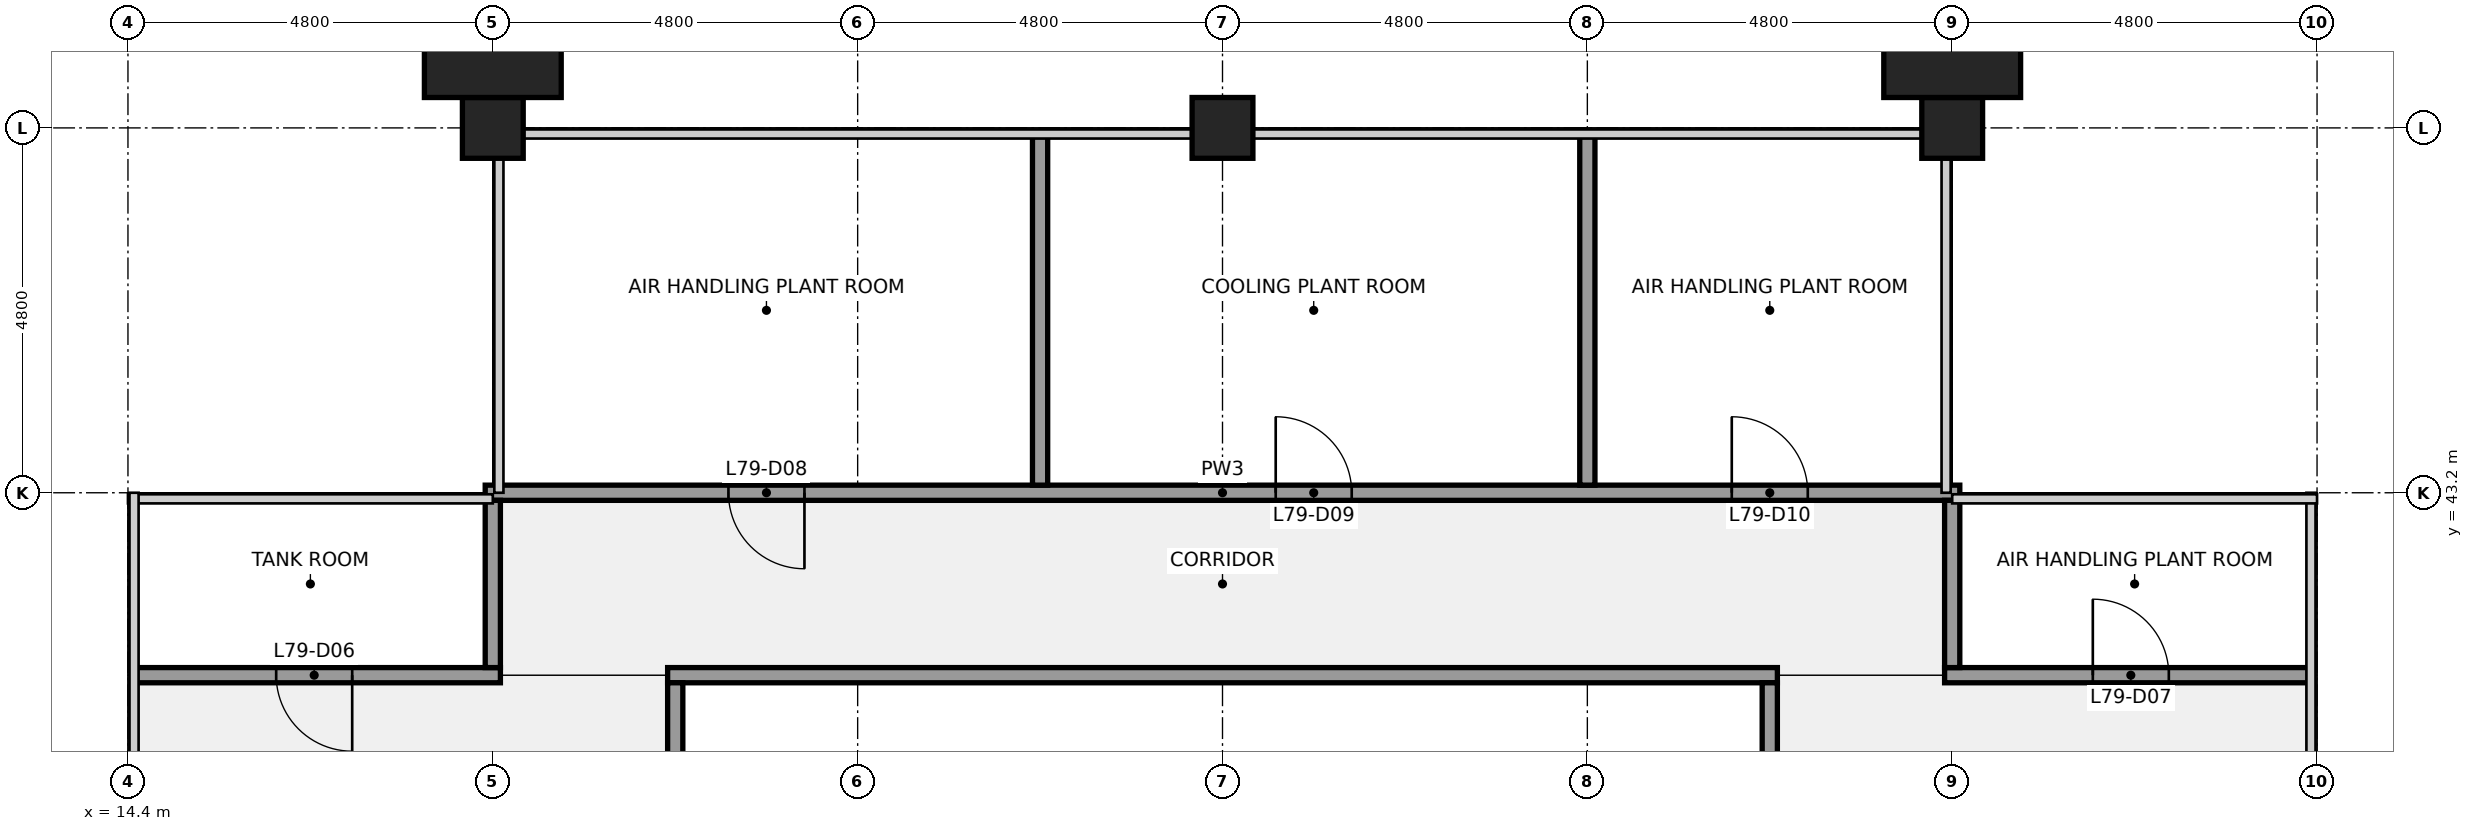
"""IFC4 building model, lengths in metres.
Left out: names, types, materials, properties, quantities, classifications, styles, units other than length and angle.
Written with IfcOpenShell. Run it as: python <this file> out.ifc"""

import sys

from ifc_helpers import new_model, si_unit, direction, frame, frame_2d, origin, origin_2d, place, context, subcontext, project, spatial, rectangle, extrude, element, fill, save


model = new_model("IFC4")
c1 = context("Model", 3, precision=1e-05, world=origin(), true_north=direction((0.0, 1.0)))
c2 = subcontext(c1, "Body", "Model", "MODEL_VIEW")
j1 = project(units=[si_unit("LENGTHUNIT", "METRE"), si_unit("PLANEANGLEUNIT", "RADIAN")], contexts=[c1])
p1 = place(None, origin())
s1 = spatial("IfcSite", under=j1, at=p1, CompositionType="ELEMENT")
p2 = place(p1, origin())
s2 = spatial("IfcBuilding", under=s1, at=p2, CompositionType="ELEMENT")
p3 = place(p2, frame((0.0, 0.0, 354.3)))
s3 = spatial("IfcBuildingStorey", under=s2, at=p3, CompositionType="ELEMENT", Elevation=354.3)
for number, where, z_axis, x_axis in (
    (1, (19.2, 48.0, 0.0), (0.0, 0.0, 1.0), (1.0, 0.0, 0.0)),
    (2, (28.8, 48.0, 0.0), (0.0, 0.0, 1.0), (1.0, 0.0, 0.0)),
    (3, (38.4, 48.0, 0.0), (0.0, 0.0, 1.0), (1.0, 0.0, 0.0)),
):
    element("IfcColumn", number, at=place(p3, frame(where, z_axis=z_axis, x_axis=x_axis)), inside=s3, PredefinedType="COLUMN", context=c2, shape_type="SweptSolid", body=[
        extrude(rectangle(XDim=0.8, YDim=0.8, at=origin_2d()), origin(), (0.0, 0.0, 1.0), 4.0),
    ])
p4 = place(p3, frame((14.5, 40.8, 0.0), z_axis=(0.0, 0.0, 1.0), x_axis=(1.0, 0.0, 0.0)))
e4 = element("IfcWall", 4, at=p4, inside=s3, PredefinedType="PARTITIONING", context=c2, shape_type="SweptSolid", body=[
    extrude(rectangle(XDim=4.8, YDim=0.2, at=frame_2d((2.4, 0.0))), origin(), (0.0, 0.0, 1.0), 2.759),
])
p5 = place(p4, frame((1.85, 0.0, 0.0)))
e5 = element("IfcOpeningElement", 5, at=p5, cuts=e4, PredefinedType="OPENING", context=c2, shape_type="SweptSolid", body=[
    extrude(rectangle(XDim=1.0, YDim=2.1, at=frame_2d((0.5, 1.05))), frame((0.0, 0.11, 0.0), z_axis=(0.0, -1.0, 0.0), x_axis=(1.0, 0.0, 0.0)), (0.0, 0.0, 1.0), 0.22),
])
p6 = place(p3, frame((21.5, 40.8, 0.0), z_axis=(0.0, 0.0, 1.0), x_axis=(1.0, 0.0, 0.0)))
e6 = element("IfcWall", 6, at=p6, inside=s3, PredefinedType="PARTITIONING", context=c2, shape_type="SweptSolid", body=[
    extrude(rectangle(XDim=14.6, YDim=0.2, at=frame_2d((7.3, 0.0))), origin(), (0.0, 0.0, 1.0), 2.759),
])
p7 = place(p3, frame((38.3, 40.8, 0.0), z_axis=(0.0, 0.0, 1.0), x_axis=(1.0, 0.0, 0.0)))
e7 = element("IfcWall", 7, at=p7, inside=s3, PredefinedType="PARTITIONING", context=c2, shape_type="SweptSolid", body=[
    extrude(rectangle(XDim=4.8, YDim=0.2, at=frame_2d((2.4, 0.0))), origin(), (0.0, 0.0, 1.0), 2.759),
])
p8 = place(p7, frame((1.95, 0.0, 0.0)))
e8 = element("IfcOpeningElement", 8, at=p8, cuts=e7, PredefinedType="OPENING", context=c2, shape_type="SweptSolid", body=[
    extrude(rectangle(XDim=1.0, YDim=2.1, at=frame_2d((0.5, 1.05))), frame((0.0, 0.11, 0.0), z_axis=(0.0, -1.0, 0.0), x_axis=(1.0, 0.0, 0.0)), (0.0, 0.0, 1.0), 0.22),
])
p9 = place(p3, frame((19.1, 43.2, 0.0), z_axis=(0.0, 0.0, 1.0), x_axis=(1.0, 0.0, 0.0)))
e9 = element("IfcWall", 9, at=p9, inside=s3, PredefinedType="PARTITIONING", context=c2, shape_type="SweptSolid", body=[
    extrude(rectangle(XDim=19.4, YDim=0.2, at=frame_2d((9.7, 0.0))), origin(), (0.0, 0.0, 1.0), 2.759),
])
p10 = place(p9, frame((3.2, 0.0, 0.0)))
e10 = element("IfcOpeningElement", 10, at=p10, cuts=e9, PredefinedType="OPENING", context=c2, shape_type="SweptSolid", body=[
    extrude(rectangle(XDim=1.0, YDim=2.1, at=frame_2d((0.5, 1.05))), frame((0.0, 0.11, 0.0), z_axis=(0.0, -1.0, 0.0), x_axis=(1.0, 0.0, 0.0)), (0.0, 0.0, 1.0), 0.22),
])
p11 = place(p9, frame((10.4, 0.0, 0.0)))
e11 = element("IfcOpeningElement", 11, at=p11, cuts=e9, PredefinedType="OPENING", context=c2, shape_type="SweptSolid", body=[
    extrude(rectangle(XDim=1.0, YDim=2.1, at=frame_2d((0.5, 1.05))), frame((0.0, 0.11, 0.0), z_axis=(0.0, -1.0, 0.0), x_axis=(1.0, 0.0, 0.0)), (0.0, 0.0, 1.0), 0.22),
])
p12 = place(p9, frame((16.4, 0.0, 0.0)))
e12 = element("IfcOpeningElement", 12, at=p12, cuts=e9, PredefinedType="OPENING", context=c2, shape_type="SweptSolid", body=[
    extrude(rectangle(XDim=1.0, YDim=2.1, at=frame_2d((0.5, 1.05))), frame((0.0, 0.11, 0.0), z_axis=(0.0, -1.0, 0.0), x_axis=(1.0, 0.0, 0.0)), (0.0, 0.0, 1.0), 0.22),
])
p13 = place(p3, frame((19.2, 40.9, 0.0), z_axis=(0.0, 0.0, 1.0), x_axis=(0.0, 1.0, 0.0)))
e13 = element("IfcWall", 13, at=p13, inside=s3, PredefinedType="PARTITIONING", context=c2, shape_type="SweptSolid", body=[
    extrude(rectangle(XDim=2.2, YDim=0.2, at=frame_2d((1.1, 0.0))), origin(), (0.0, 0.0, 1.0), 2.759),
])
p14 = place(p3, frame((21.6, 24.1, 0.0), z_axis=(0.0, 0.0, 1.0), x_axis=(0.0, 1.0, 0.0)))
e14 = element("IfcWall", 14, at=p14, inside=s3, PredefinedType="PARTITIONING", context=c2, shape_type="SweptSolid", body=[
    extrude(rectangle(XDim=16.6, YDim=0.2, at=frame_2d((8.3, 0.0))), origin(), (0.0, 0.0, 1.0), 2.759),
])
p15 = place(p14, frame((7.8, 0.0, 0.0)))
e15 = element("IfcOpeningElement", 15, at=p15, cuts=e14, PredefinedType="OPENING", context=c2, shape_type="SweptSolid", body=[
    extrude(rectangle(XDim=1.0, YDim=2.1, at=frame_2d((0.5, 1.05))), frame((0.0, 0.11, 0.0), z_axis=(0.0, -1.0, 0.0), x_axis=(1.0, 0.0, 0.0)), (0.0, 0.0, 1.0), 0.22),
])
for number, where, z_axis, x_axis in (
    (16, (26.4, 43.3, 0.0), (0.0, 0.0, 1.0), (0.0, 1.0, 0.0)),
    (17, (33.6, 43.3, 0.0), (0.0, 0.0, 1.0), (0.0, 1.0, 0.0)),
):
    element("IfcWall", number, at=place(p3, frame(where, z_axis=z_axis, x_axis=x_axis)), inside=s3, PredefinedType="PARTITIONING", context=c2, shape_type="SweptSolid", body=[
        extrude(rectangle(XDim=4.6, YDim=0.2, at=frame_2d((2.3, 0.0))), origin(), (0.0, 0.0, 1.0), 2.759),
    ])
p16 = place(p3, frame((36.0, 24.1, 0.0), z_axis=(0.0, 0.0, 1.0), x_axis=(0.0, 1.0, 0.0)))
e18 = element("IfcWall", 18, at=p16, inside=s3, PredefinedType="PARTITIONING", context=c2, shape_type="SweptSolid", body=[
    extrude(rectangle(XDim=16.6, YDim=0.2, at=frame_2d((8.3, 0.0))), origin(), (0.0, 0.0, 1.0), 2.759),
])
p17 = place(p3, frame((38.4, 40.9, 0.0), z_axis=(0.0, 0.0, 1.0), x_axis=(0.0, 1.0, 0.0)))
e19 = element("IfcWall", 19, at=p17, inside=s3, PredefinedType="PARTITIONING", context=c2, shape_type="SweptSolid", body=[
    extrude(rectangle(XDim=2.2, YDim=0.2, at=frame_2d((1.1, 0.0))), origin(), (0.0, 0.0, 1.0), 2.759),
])
for number, where, z_axis, x_axis in (
    (20, (19.2, 48.95, 0.0), (0.0, 0.0, 1.0), (1.0, 0.0, 0.0)),
    (21, (38.4, 48.95, 0.0), (0.0, 0.0, 1.0), (1.0, 0.0, 0.0)),
):
    element("IfcColumn", number, at=place(p3, frame(where, z_axis=z_axis, x_axis=x_axis)), inside=s3, PredefinedType="PILASTER", context=c2, shape_type="SweptSolid", body=[
        extrude(rectangle(XDim=1.8, YDim=1.1, at=origin_2d()), origin(), (0.0, 0.0, 1.0), 4.0),
    ])
p18 = place(p5, origin())
e22 = element("IfcDoor", 22, at=p18, inside=s3, OperationType="SINGLE_SWING_RIGHT", PredefinedType="DOOR", context=c2, shape_type="SweptSolid", body=[
    extrude(rectangle(XDim=1.0, YDim=2.1, at=frame_2d((0.5, 1.05))), frame((0.0, 0.025, 0.0), z_axis=(0.0, -1.0, 0.0), x_axis=(1.0, 0.0, 0.0)), (0.0, 0.0, 1.0), 0.05),
])
fill(e5, e22)
p19 = place(p8, origin())
e23 = element("IfcDoor", 23, at=p19, inside=s3, OperationType="SINGLE_SWING_LEFT", PredefinedType="DOOR", context=c2, shape_type="SweptSolid", body=[
    extrude(rectangle(XDim=1.0, YDim=2.1, at=frame_2d((0.5, 1.05))), frame((0.0, 0.025, 0.0), z_axis=(0.0, -1.0, 0.0), x_axis=(1.0, 0.0, 0.0)), (0.0, 0.0, 1.0), 0.05),
])
fill(e8, e23)
p20 = place(p10, origin())
e24 = element("IfcDoor", 24, at=p20, inside=s3, OperationType="SINGLE_SWING_RIGHT", PredefinedType="DOOR", context=c2, shape_type="SweptSolid", body=[
    extrude(rectangle(XDim=1.0, YDim=2.1, at=frame_2d((0.5, 1.05))), frame((0.0, 0.025, 0.0), z_axis=(0.0, -1.0, 0.0), x_axis=(1.0, 0.0, 0.0)), (0.0, 0.0, 1.0), 0.05),
])
fill(e10, e24)
p21 = place(p11, origin())
e25 = element("IfcDoor", 25, at=p21, inside=s3, OperationType="SINGLE_SWING_LEFT", PredefinedType="DOOR", context=c2, shape_type="SweptSolid", body=[
    extrude(rectangle(XDim=1.0, YDim=2.1, at=frame_2d((0.5, 1.05))), frame((0.0, 0.025, 0.0), z_axis=(0.0, -1.0, 0.0), x_axis=(1.0, 0.0, 0.0)), (0.0, 0.0, 1.0), 0.05),
])
fill(e11, e25)
p22 = place(p12, origin())
e26 = element("IfcDoor", 26, at=p22, inside=s3, OperationType="SINGLE_SWING_LEFT", PredefinedType="DOOR", context=c2, shape_type="SweptSolid", body=[
    extrude(rectangle(XDim=1.0, YDim=2.1, at=frame_2d((0.5, 1.05))), frame((0.0, 0.025, 0.0), z_axis=(0.0, -1.0, 0.0), x_axis=(1.0, 0.0, 0.0)), (0.0, 0.0, 1.0), 0.05),
])
fill(e12, e26)
save(model, sys.argv[1])
